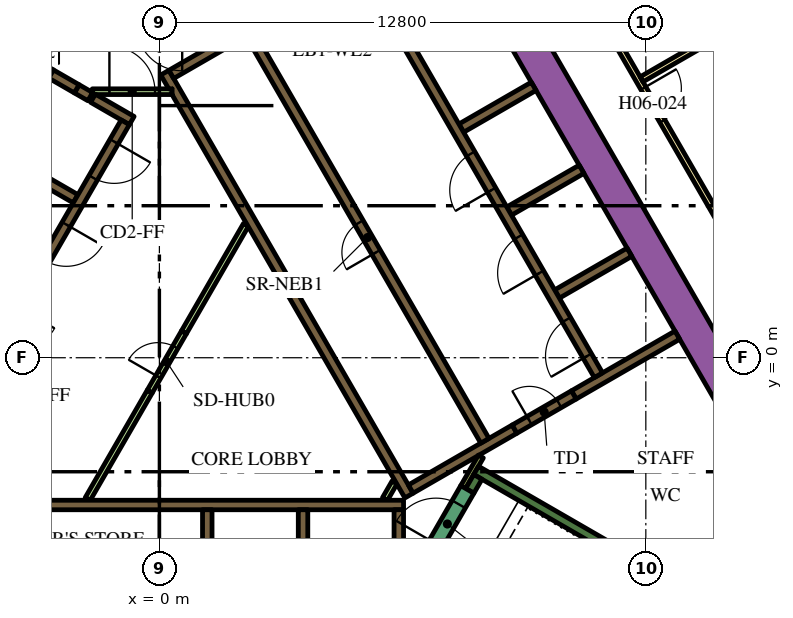
"""IFC4 building model, lengths in metres.
Left out: names, types, materials, properties, quantities, classifications, styles, units other than length and angle.
Written with IfcOpenShell. Run it as: python <this file> out.ifc"""

import sys

from ifc_helpers import new_model, si_unit, direction, frame, frame_2d, origin, place, context, subcontext, project, spatial, polyline, rectangle, outline, extrude, element, fill, save


model = new_model("IFC4")
c1 = context("Model", 3, precision=1e-05, world=origin(), true_north=direction((0.0, 1.0)))
c2 = subcontext(c1, "Body", "Model", "MODEL_VIEW")
j1 = project(units=[si_unit("LENGTHUNIT", "METRE"), si_unit("PLANEANGLEUNIT", "RADIAN")], contexts=[c1])
p1 = place(None, origin())
s1 = spatial("IfcSite", under=j1, at=p1, CompositionType="ELEMENT")
p2 = place(p1, origin())
s2 = spatial("IfcBuilding", under=s1, at=p2, CompositionType="ELEMENT")
p3 = place(p2, frame((0.0, 0.0, 83.7)))
s3 = spatial("IfcBuildingStorey", under=s2, at=p3, CompositionType="ELEMENT", Elevation=83.7)
p4 = place(p3, frame((6.776, 13.364, 0.0), z_axis=(0.0, 0.0, 1.0), x_axis=(0.500004177138, -0.8660229921, 0.0)))
e1 = element("IfcWall", 1, at=p4, inside=s3, PredefinedType="SOLIDWALL", context=c2, shape_type="SweptSolid", body=[
    extrude(rectangle(XDim=20.204, YDim=0.9, at=frame_2d((10.102, 0.0))), origin(), (0.0, 0.0, 1.0), 3.9),
])
p5 = place(p3, frame((11.695, -12.644, 0.0), z_axis=(0.0, 0.0, 1.0), x_axis=(0.500010229568, 0.86601949766, 0.0)))
e2 = element("IfcWall", 2, at=p5, inside=s3, PredefinedType="SOLIDWALL", context=c2, shape_type="SweptSolid", body=[
    extrude(rectangle(XDim=9.326, YDim=0.9, at=frame_2d((4.663, 0.0))), origin(), (0.0, 0.0, 1.0), 3.9),
])
p6 = place(p3, frame((8.334, -2.964, 0.0), z_axis=(0.0, 0.0, 1.0), x_axis=(0.866016039709, -0.500016218704, 0.0)))
e3 = element("IfcWall", 3, at=p6, inside=s3, PredefinedType="SOLIDWALL", context=c2, shape_type="SweptSolid", body=[
    extrude(rectangle(XDim=7.05, YDim=0.25, at=frame_2d((3.525, 0.0))), origin(), (0.0, 0.0, 1.0), 3.9),
])
p7 = place(p3, frame((8.168, -3.503, 0.0), z_axis=(0.0, 0.0, 1.0), x_axis=(0.49972245349, 0.866185586049, 0.0)))
e4 = element("IfcWall", 4, at=p7, inside=s3, PredefinedType="SOLIDWALL", context=c2, shape_type="SweptSolid", body=[
    extrude(rectangle(XDim=0.425, YDim=0.25, at=frame_2d((0.212, 0.0))), origin(), (0.0, 0.0, 1.0), 3.9),
])
p8 = place(p3, frame((-5.845, -3.875, 0.0), z_axis=(0.0, 0.0, 1.0), x_axis=(1.0, 0.0, 0.0)))
e5 = element("IfcWall", 5, at=p8, inside=s3, PredefinedType="SOLIDWALL", context=c2, shape_type="SweptSolid", body=[
    extrude(rectangle(XDim=12.27, YDim=0.25, at=frame_2d((6.135, 0.0))), origin(), (0.0, 0.0, 1.0), 3.9),
])
p9 = place(p3, frame((6.3, -7.268, 0.0), z_axis=(0.0, 0.0, 1.0), x_axis=(0.0, 1.0, 0.0)))
e6 = element("IfcWall", 6, at=p9, inside=s3, PredefinedType="SOLIDWALL", context=c2, shape_type="SweptSolid", body=[
    extrude(rectangle(XDim=3.268, YDim=0.25, at=frame_2d((1.634, 0.0))), origin(), (0.0, 0.0, 1.0), 3.9),
])
for number, where, z_axis, x_axis in (
    (7, (3.78, -4.0, 0.0), (0.0, 0.0, 1.0), (0.0, -1.0, 0.0)),
    (8, (1.26, -4.0, 0.0), (0.0, 0.0, 1.0), (0.0, -1.0, 0.0)),
    (9, (10.464, 1.677, 0.0), (0.0, 0.0, 1.0), (0.866, 0.5, 0.0)),
):
    element("IfcWall", number, at=place(p3, frame(where, z_axis=z_axis, x_axis=x_axis)), inside=s3, PredefinedType="SOLIDWALL", context=c2, shape_type="SweptSolid", body=[
        extrude(rectangle(XDim=2.2, YDim=0.25, at=frame_2d((1.1, 0.0))), origin(), (0.0, 0.0, 1.0), 3.9),
    ])
p10 = place(p3, frame((13.629, 0.594, 0.0), z_axis=(0.0, 0.0, 1.0), x_axis=(-0.86602790099, -0.499995674689, 0.0)))
e10 = element("IfcWall", 10, at=p10, inside=s3, PredefinedType="SOLIDWALL", context=c2, shape_type="SweptSolid", body=[
    extrude(rectangle(XDim=3.146, YDim=0.25, at=frame_2d((1.573, 0.0))), origin(), (0.0, 0.0, 1.0), 3.9),
])
p11 = place(p3, origin())
e11 = element("IfcWall", 11, at=p11, inside=s3, PredefinedType="SOLIDWALL", context=c2, shape_type="SweptSolid", body=[
    extrude(outline(polyline([(0.335, 6.925), (0.335, 7.075), (0.335, 7.075), (0.335, 7.075), (0.245, 7.075), (0.079, 7.363), (0.035, 7.439), (0.252, 7.564), (0.377, 7.348), (6.552, -3.348), (6.677, -3.564), (6.46, -3.689), (4.897, -0.981), (0.332, 6.925), (0.335, 6.925), (0.335, 6.925), (0.335, 6.925)])), origin(), (0.0, 0.0, 1.0), 3.9),
])
p12 = place(p3, frame((0.314, 7.456, 0.0), z_axis=(0.0, 0.0, 1.0), x_axis=(0.866013897511, 0.50001992892, 0.0)))
e12 = element("IfcWall", 12, at=p12, inside=s3, PredefinedType="SOLIDWALL", context=c2, shape_type="SweptSolid", body=[
    extrude(rectangle(XDim=3.268, YDim=0.25, at=frame_2d((1.634, 0.0))), origin(), (0.0, 0.0, 1.0), 3.9),
])
p13 = place(p3, frame((6.614, -3.456, 0.0), z_axis=(0.0, 0.0, 1.0), x_axis=(0.86602447079, 0.500001615989, 0.0)))
e13 = element("IfcWall", 13, at=p13, inside=s3, PredefinedType="SOLIDWALL", context=c2, shape_type="SweptSolid", body=[
    extrude(rectangle(XDim=3.154, YDim=0.25, at=frame_2d((1.577, 0.0))), origin(), (0.0, 0.0, 1.0), 3.9),
])
for number, where, z_axis, x_axis in (
    (14, (7.944, 6.041, 0.0), (0.0, 0.0, 1.0), (0.866, 0.5, 0.0)),
    (15, (9.204, 3.859, 0.0), (0.0, 0.0, 1.0), (0.866, 0.5, 0.0)),
):
    element("IfcWall", number, at=place(p3, frame(where, z_axis=z_axis, x_axis=x_axis)), inside=s3, PredefinedType="SOLIDWALL", context=c2, shape_type="SweptSolid", body=[
        extrude(rectangle(XDim=2.2, YDim=0.25, at=frame_2d((1.1, 0.0))), origin(), (0.0, 0.0, 1.0), 3.9),
    ])
p14 = place(p3, frame((-8.06, -1.311, 0.0), z_axis=(0.0, 0.0, 1.0), x_axis=(0.50000273126, 0.866023826885, 0.0)))
e16 = element("IfcWall", 16, at=p14, inside=s3, PredefinedType="SOLIDWALL", context=c2, shape_type="SweptSolid", body=[
    extrude(rectangle(XDim=10.33, YDim=0.25, at=frame_2d((5.165, 0.0))), origin(), (0.0, 0.0, 1.0), 3.9),
])
p15 = place(p3, frame((-1.819, 6.87, 0.0), z_axis=(0.0, 0.0, 1.0), x_axis=(-0.866294599386, 0.499533449405, 0.0)))
e17 = element("IfcWall", 17, at=p15, inside=s3, PredefinedType="SOLIDWALL", context=c2, shape_type="SweptSolid", body=[
    extrude(rectangle(XDim=0.41, YDim=0.25, at=frame_2d((0.205, 0.0))), origin(), (0.0, 0.0, 1.0), 3.9),
])
p16 = place(p3, frame((-2.849, 7.465, 0.0), z_axis=(0.0, 0.0, 1.0), x_axis=(0.865955664968, -0.500120771724, 0.0)))
e18 = element("IfcWall", 18, at=p16, inside=s3, PredefinedType="SOLIDWALL", context=c2, shape_type="SweptSolid", body=[
    extrude(rectangle(XDim=0.778, YDim=0.25, at=frame_2d((0.389, 0.0))), origin(), (0.0, 0.0, 1.0), 3.9),
])
p17 = place(p3, frame((-0.728, 6.24, 0.0), z_axis=(0.0, 0.0, 1.0), x_axis=(-0.866002680491, 0.500039355833, 0.0)))
e19 = element("IfcWall", 19, at=p17, inside=s3, PredefinedType="SOLIDWALL", context=c2, shape_type="SweptSolid", body=[
    extrude(rectangle(XDim=1.178, YDim=0.25, at=frame_2d((0.589, 0.0))), origin(), (0.0, 0.0, 1.0), 3.9),
])
p18 = place(p3, frame((-2.204, 4.182, 0.0), z_axis=(0.0, 0.0, 1.0), x_axis=(-0.866008176907, 0.50002983664, 0.0)))
e20 = element("IfcWall", 20, at=p18, inside=s3, PredefinedType="SOLIDWALL", context=c2, shape_type="SweptSolid", body=[
    extrude(rectangle(XDim=2.2, YDim=0.25, at=frame_2d((1.1, 0.0))), origin(), (0.0, 0.0, 1.0), 3.9),
])
p19 = place(p3, frame((5.936, -3.718, 0.0), z_axis=(0.0, 0.0, 1.0), x_axis=(0.499890179513, 0.866088799389, 0.0)))
e21 = element("IfcWall", 21, at=p19, inside=s3, PredefinedType="PARTITIONING", context=c2, shape_type="SweptSolid", body=[
    extrude(rectangle(XDim=0.504, YDim=0.15, at=frame_2d((0.252, 0.0))), origin(), (0.0, 0.0, 1.0), 2.75),
])
p20 = place(p3, frame((8.459, -2.599, 0.0), z_axis=(0.0, 0.0, 1.0), x_axis=(-0.500041054325, -0.866001699761, 0.0)))
e22 = element("IfcWall", 22, at=p20, inside=s3, PredefinedType="PARTITIONING", context=c2, shape_type="SweptSolid", body=[
    extrude(rectangle(XDim=0.929, YDim=0.15, at=frame_2d((0.464, 0.0))), origin(), (0.0, 0.0, 1.0), 3.9),
])
for number, where, z_axis, x_axis in (
    (23, (-1.887, -3.718, 0.0), (0.0, 0.0, 1.0), (0.5, 0.866, 0.0)),
    (24, (0.645, 0.667, 0.0), (0.0, 0.0, 1.0), (0.5, 0.866, 0.0)),
):
    element("IfcWall", number, at=place(p3, frame(where, z_axis=z_axis, x_axis=x_axis)), inside=s3, PredefinedType="PARTITIONING", context=c2, shape_type="SweptSolid", body=[
        extrude(rectangle(XDim=3.263, YDim=0.15, at=frame_2d((1.632, 0.0))), origin(), (0.0, 0.0, 1.0), 2.75),
    ])
p21 = place(p3, frame((11.553, -0.46, 0.0), z_axis=(0.0, 0.0, 1.0), x_axis=(-0.500006514828, 0.866021642414, 0.0)))
e25 = element("IfcWall", 25, at=p21, inside=s3, PredefinedType="SOLIDWALL", context=c2, shape_type="SweptSolid", body=[
    extrude(rectangle(XDim=12.35, YDim=0.25, at=frame_2d((6.175, 0.0))), origin(), (0.0, 0.0, 1.0), 3.9),
])
p22 = place(p21, frame((0.585, 0.0, 0.0)))
e26 = element("IfcOpeningElement", 26, at=p22, cuts=e25, PredefinedType="OPENING", context=c2, shape_type="SweptSolid", body=[
    extrude(rectangle(XDim=1.1, YDim=2.1, at=frame_2d((0.55, 1.05))), frame((0.0, 0.135, 0.0), z_axis=(0.0, -1.0, 0.0), x_axis=(1.0, 0.0, 0.0)), (0.0, 0.0, 1.0), 0.27),
])
p23 = place(p21, frame((3.105, 0.0, 0.0)))
e27 = element("IfcOpeningElement", 27, at=p23, cuts=e25, PredefinedType="OPENING", context=c2, shape_type="SweptSolid", body=[
    extrude(rectangle(XDim=1.1, YDim=2.1, at=frame_2d((0.55, 1.05))), frame((0.0, 0.135, 0.0), z_axis=(0.0, -1.0, 0.0), x_axis=(1.0, 0.0, 0.0)), (0.0, 0.0, 1.0), 0.27),
])
p24 = place(p21, frame((5.625, 0.0, 0.0)))
e28 = element("IfcOpeningElement", 28, at=p24, cuts=e25, PredefinedType="OPENING", context=c2, shape_type="SweptSolid", body=[
    extrude(rectangle(XDim=1.1, YDim=2.1, at=frame_2d((0.55, 1.05))), frame((0.0, 0.135, 0.0), z_axis=(0.0, -1.0, 0.0), x_axis=(1.0, 0.0, 0.0)), (0.0, 0.0, 1.0), 0.27),
])
p25 = place(p3, frame((8.565, -2.185, 0.0), z_axis=(0.0, 0.0, 1.0), x_axis=(-0.499997954832, 0.866026584559, 0.0)))
e29 = element("IfcWall", 29, at=p25, inside=s3, PredefinedType="SOLIDWALL", context=c2, shape_type="SweptSolid", body=[
    extrude(rectangle(XDim=12.35, YDim=0.25, at=frame_2d((6.175, 0.0))), origin(), (0.0, 0.0, 1.0), 3.9),
])
p26 = place(p25, frame((5.725, 0.0, 0.0)))
e30 = element("IfcOpeningElement", 30, at=p26, cuts=e29, PredefinedType="OPENING", context=c2, shape_type="SweptSolid", body=[
    extrude(rectangle(XDim=0.9, YDim=2.1, at=frame_2d((0.45, 1.05))), frame((0.0, 0.135, 0.0), z_axis=(0.0, -1.0, 0.0), x_axis=(1.0, 0.0, 0.0)), (0.0, 0.0, 1.0), 0.27),
])
p27 = place(p3, frame((-0.898, 6.194, 0.0), z_axis=(0.0, 0.0, 1.0), x_axis=(-0.499996202215, -0.866027596426, 0.0)))
e31 = element("IfcWall", 31, at=p27, inside=s3, PredefinedType="SOLIDWALL", context=c2, shape_type="SweptSolid", body=[
    extrude(rectangle(XDim=9.83, YDim=0.25, at=frame_2d((4.915, 0.0))), origin(), (0.0, 0.0, 1.0), 3.9),
])
p28 = place(p27, frame((0.585, 0.0, 0.0)))
e32 = element("IfcOpeningElement", 32, at=p28, cuts=e31, PredefinedType="OPENING", context=c2, shape_type="SweptSolid", body=[
    extrude(rectangle(XDim=1.1, YDim=2.1, at=frame_2d((0.55, 1.05))), frame((0.0, 0.135, 0.0), z_axis=(0.0, -1.0, 0.0), x_axis=(1.0, 0.0, 0.0)), (0.0, 0.0, 1.0), 0.27),
])
p29 = place(p27, frame((3.105, 0.0, 0.0)))
e33 = element("IfcOpeningElement", 33, at=p29, cuts=e31, PredefinedType="OPENING", context=c2, shape_type="SweptSolid", body=[
    extrude(rectangle(XDim=1.1, YDim=2.1, at=frame_2d((0.55, 1.05))), frame((0.0, 0.135, 0.0), z_axis=(0.0, -1.0, 0.0), x_axis=(1.0, 0.0, 0.0)), (0.0, 0.0, 1.0), 0.27),
])
p30 = place(p27, frame((5.625, 0.0, 0.0)))
e34 = element("IfcOpeningElement", 34, at=p30, cuts=e31, PredefinedType="OPENING", context=c2, shape_type="SweptSolid", body=[
    extrude(rectangle(XDim=1.1, YDim=2.1, at=frame_2d((0.55, 1.05))), frame((0.0, 0.135, 0.0), z_axis=(0.0, -1.0, 0.0), x_axis=(1.0, 0.0, 0.0)), (0.0, 0.0, 1.0), 0.27),
])
p31 = place(p27, frame((8.145, 0.0, 0.0)))
e35 = element("IfcOpeningElement", 35, at=p31, cuts=e31, PredefinedType="OPENING", context=c2, shape_type="SweptSolid", body=[
    extrude(rectangle(XDim=1.1, YDim=2.1, at=frame_2d((0.55, 1.05))), frame((0.0, 0.135, 0.0), z_axis=(0.0, -1.0, 0.0), x_axis=(1.0, 0.0, 0.0)), (0.0, 0.0, 1.0), 0.27),
])
p32 = place(p3, frame((7.053, -5.284, 0.0), z_axis=(0.0, 0.0, 1.0), x_axis=(0.500078061341, 0.865980330357, 0.0)))
e36 = element("IfcWall", 36, at=p32, inside=s3, PredefinedType="SOLIDWALL", context=c2, shape_type="SweptSolid", body=[
    extrude(rectangle(XDim=2.1, YDim=0.4, at=frame_2d((1.05, 0.0))), origin(), (0.0, 0.0, 1.0), 3.9),
])
p33 = place(p32, frame((0.45, 0.0, 0.0)))
e37 = element("IfcOpeningElement", 37, at=p33, cuts=e36, PredefinedType="OPENING", context=c2, shape_type="SweptSolid", body=[
    extrude(rectangle(XDim=1.2, YDim=2.1, at=frame_2d((0.6, 1.05))), frame((0.0, 0.21, 0.0), z_axis=(0.0, -1.0, 0.0), x_axis=(1.0, 0.0, 0.0)), (0.0, 0.0, 1.0), 0.42),
])
p34 = place(p3, frame((9.346, -1.879, 0.0), z_axis=(0.0, 0.0, 1.0), x_axis=(0.866047807691, 0.499961193289, 0.0)))
e38 = element("IfcWall", 38, at=p34, inside=s3, PredefinedType="SOLIDWALL", context=c2, shape_type="SweptSolid", body=[
    extrude(rectangle(XDim=1.8, YDim=0.25, at=frame_2d((0.9, 0.0))), origin(), (0.0, 0.0, 1.0), 3.9),
])
p35 = place(p34, frame((0.45, 0.0, 0.0)))
e39 = element("IfcOpeningElement", 39, at=p35, cuts=e38, PredefinedType="OPENING", context=c2, shape_type="SweptSolid", body=[
    extrude(rectangle(XDim=0.9, YDim=2.1, at=frame_2d((0.45, 1.05))), frame((0.0, 0.135, 0.0), z_axis=(0.0, -1.0, 0.0), x_axis=(1.0, 0.0, 0.0)), (0.0, 0.0, 1.0), 0.27),
])
p36 = place(p3, frame((-1.765, 7.0, 0.0), z_axis=(0.0, 0.0, 1.0), x_axis=(1.0, 0.0, 0.0)))
e40 = element("IfcWall", 40, at=p36, inside=s3, PredefinedType="PARTITIONING", context=c2, shape_type="SweptSolid", body=[
    extrude(rectangle(XDim=2.1, YDim=0.15, at=frame_2d((1.05, 0.0))), origin(), (0.0, 0.0, 1.0), 2.75),
])
p37 = place(p36, frame((0.45, 0.0, 0.0)))
e41 = element("IfcOpeningElement", 41, at=p37, cuts=e40, PredefinedType="OPENING", context=c2, shape_type="SweptSolid", body=[
    extrude(rectangle(XDim=1.2, YDim=2.1, at=frame_2d((0.6, 1.05))), frame((0.0, 0.085, 0.0), z_axis=(0.0, -1.0, 0.0), x_axis=(1.0, 0.0, 0.0)), (0.0, 0.0, 1.0), 0.17),
])
p38 = place(p3, frame((-0.255, -0.892, 0.0), z_axis=(0.0, 0.0, 1.0), x_axis=(0.500062916607, 0.865989075817, 0.0)))
e42 = element("IfcWall", 42, at=p38, inside=s3, PredefinedType="PARTITIONING", context=c2, shape_type="SweptSolid", body=[
    extrude(rectangle(XDim=1.8, YDim=0.15, at=frame_2d((0.9, 0.0))), origin(), (0.0, 0.0, 1.0), 2.75),
])
p39 = place(p38, frame((0.45, 0.0, 0.0)))
e43 = element("IfcOpeningElement", 43, at=p39, cuts=e42, PredefinedType="OPENING", context=c2, shape_type="SweptSolid", body=[
    extrude(rectangle(XDim=0.9, YDim=2.1, at=frame_2d((0.45, 1.05))), frame((0.0, 0.085, 0.0), z_axis=(0.0, -1.0, 0.0), x_axis=(1.0, 0.0, 0.0)), (0.0, 0.0, 1.0), 0.17),
])
p40 = place(p3, frame((6.163, 18.475, 0.0), z_axis=(0.0, 0.0, 1.0), x_axis=(0.500001317485, -0.866024643133, 0.0)))
e44 = element("IfcWall", 44, at=p40, inside=s3, PredefinedType="PARTITIONING", context=c2, shape_type="SweptSolid", body=[
    extrude(rectangle(XDim=25.767, YDim=0.15, at=frame_2d((12.883, 0.0))), origin(), (0.0, 0.0, 1.0), 2.75),
])
p41 = place(p40, frame((24.241, 0.0, 0.0)))
e45 = element("IfcOpeningElement", 45, at=p41, cuts=e44, PredefinedType="OPENING", context=c2, shape_type="SweptSolid", body=[
    extrude(rectangle(XDim=1.0, YDim=2.1, at=frame_2d((0.5, 1.05))), frame((0.0, 0.085, 0.0), z_axis=(0.0, -1.0, 0.0), x_axis=(1.0, 0.0, 0.0)), (0.0, 0.0, 1.0), 0.17),
])
p42 = place(p40, frame((13.144, 0.0, 0.0)))
e46 = element("IfcOpeningElement", 46, at=p42, cuts=e44, PredefinedType="OPENING", context=c2, shape_type="SweptSolid", body=[
    extrude(rectangle(XDim=1.0, YDim=2.1, at=frame_2d((0.5, 1.05))), frame((0.0, 0.085, 0.0), z_axis=(0.0, -1.0, 0.0), x_axis=(1.0, 0.0, 0.0)), (0.0, 0.0, 1.0), 0.17),
])
p43 = place(p40, frame((10.874, 0.0, 0.0)))
e47 = element("IfcOpeningElement", 47, at=p43, cuts=e44, PredefinedType="OPENING", context=c2, shape_type="SweptSolid", body=[
    extrude(rectangle(XDim=0.9, YDim=2.1, at=frame_2d((0.45, 1.05))), frame((0.0, 0.085, 0.0), z_axis=(0.0, -1.0, 0.0), x_axis=(1.0, 0.0, 0.0)), (0.0, 0.0, 1.0), 0.17),
])
p44 = place(p40, frame((3.718, 0.0, 0.0)))
e48 = element("IfcOpeningElement", 48, at=p44, cuts=e44, PredefinedType="OPENING", context=c2, shape_type="SweptSolid", body=[
    extrude(rectangle(XDim=1.1, YDim=2.1, at=frame_2d((0.55, 1.05))), frame((0.0, 0.085, 0.0), z_axis=(0.0, -1.0, 0.0), x_axis=(1.0, 0.0, 0.0)), (0.0, 0.0, 1.0), 0.17),
])
p45 = place(p40, frame((2.411, 0.0, 0.0)))
e49 = element("IfcOpeningElement", 49, at=p45, cuts=e44, PredefinedType="OPENING", context=c2, shape_type="SweptSolid", body=[
    extrude(rectangle(XDim=1.0, YDim=2.1, at=frame_2d((0.5, 1.05))), frame((0.0, 0.085, 0.0), z_axis=(0.0, -1.0, 0.0), x_axis=(1.0, 0.0, 0.0)), (0.0, 0.0, 1.0), 0.17),
])
p46 = place(p3, frame((18.484, 10.672, 0.0), z_axis=(0.0, 0.0, 1.0), x_axis=(-0.866019162053, -0.50001081084, 0.0)))
e50 = element("IfcWall", 50, at=p46, inside=s3, PredefinedType="PARTITIONING", context=c2, shape_type="SweptSolid", body=[
    extrude(rectangle(XDim=6.694, YDim=0.15, at=frame_2d((3.347, 0.0))), origin(), (0.0, 0.0, 1.0), 2.75),
])
p47 = place(p22, origin())
e51 = element("IfcDoor", 51, at=p47, inside=s3, OperationType="DOUBLE_DOOR_SLIDING", PredefinedType="DOOR", context=c2, shape_type="SweptSolid", body=[
    extrude(rectangle(XDim=1.1, YDim=2.1, at=frame_2d((0.55, 1.05))), frame((0.0, 0.025, 0.0), z_axis=(0.0, -1.0, 0.0), x_axis=(1.0, 0.0, 0.0)), (0.0, 0.0, 1.0), 0.05),
])
fill(e26, e51)
p48 = place(p23, origin())
e52 = element("IfcDoor", 52, at=p48, inside=s3, OperationType="DOUBLE_DOOR_SLIDING", PredefinedType="DOOR", context=c2, shape_type="SweptSolid", body=[
    extrude(rectangle(XDim=1.1, YDim=2.1, at=frame_2d((0.55, 1.05))), frame((0.0, 0.025, 0.0), z_axis=(0.0, -1.0, 0.0), x_axis=(1.0, 0.0, 0.0)), (0.0, 0.0, 1.0), 0.05),
])
fill(e27, e52)
p49 = place(p24, origin())
e53 = element("IfcDoor", 53, at=p49, inside=s3, OperationType="DOUBLE_DOOR_SLIDING", PredefinedType="DOOR", context=c2, shape_type="SweptSolid", body=[
    extrude(rectangle(XDim=1.1, YDim=2.1, at=frame_2d((0.55, 1.05))), frame((0.0, 0.025, 0.0), z_axis=(0.0, -1.0, 0.0), x_axis=(1.0, 0.0, 0.0)), (0.0, 0.0, 1.0), 0.05),
])
fill(e28, e53)
p50 = place(p26, origin())
e54 = element("IfcDoor", 54, at=p50, inside=s3, OperationType="SINGLE_SWING_LEFT", PredefinedType="DOOR", context=c2, shape_type="SweptSolid", body=[
    extrude(rectangle(XDim=0.9, YDim=2.1, at=frame_2d((0.45, 1.05))), frame((0.0, 0.025, 0.0), z_axis=(0.0, -1.0, 0.0), x_axis=(1.0, 0.0, 0.0)), (0.0, 0.0, 1.0), 0.05),
])
fill(e30, e54)
p51 = place(p28, origin())
e55 = element("IfcDoor", 55, at=p51, inside=s3, OperationType="DOUBLE_DOOR_SLIDING", PredefinedType="DOOR", context=c2, shape_type="SweptSolid", body=[
    extrude(rectangle(XDim=1.1, YDim=2.1, at=frame_2d((0.55, 1.05))), frame((0.0, 0.025, 0.0), z_axis=(0.0, -1.0, 0.0), x_axis=(1.0, 0.0, 0.0)), (0.0, 0.0, 1.0), 0.05),
])
fill(e32, e55)
p52 = place(p29, origin())
e56 = element("IfcDoor", 56, at=p52, inside=s3, OperationType="DOUBLE_DOOR_SLIDING", PredefinedType="DOOR", context=c2, shape_type="SweptSolid", body=[
    extrude(rectangle(XDim=1.1, YDim=2.1, at=frame_2d((0.55, 1.05))), frame((0.0, 0.025, 0.0), z_axis=(0.0, -1.0, 0.0), x_axis=(1.0, 0.0, 0.0)), (0.0, 0.0, 1.0), 0.05),
])
fill(e33, e56)
p53 = place(p33, origin())
e57 = element("IfcDoor", 57, at=p53, inside=s3, OperationType="SINGLE_SWING_LEFT", PredefinedType="DOOR", context=c2, shape_type="SweptSolid", body=[
    extrude(rectangle(XDim=1.2, YDim=2.1, at=frame_2d((0.6, 1.05))), frame((0.0, 0.025, 0.0), z_axis=(0.0, -1.0, 0.0), x_axis=(1.0, 0.0, 0.0)), (0.0, 0.0, 1.0), 0.05),
])
fill(e37, e57)
p54 = place(p35, origin())
e58 = element("IfcDoor", 58, at=p54, inside=s3, OperationType="SINGLE_SWING_LEFT", PredefinedType="DOOR", context=c2, shape_type="SweptSolid", body=[
    extrude(rectangle(XDim=0.9, YDim=2.1, at=frame_2d((0.45, 1.05))), frame((0.0, 0.025, 0.0), z_axis=(0.0, -1.0, 0.0), x_axis=(1.0, 0.0, 0.0)), (0.0, 0.0, 1.0), 0.05),
])
fill(e39, e58)
p55 = place(p37, origin())
e59 = element("IfcDoor", 59, at=p55, inside=s3, OperationType="SINGLE_SWING_LEFT", PredefinedType="DOOR", context=c2, shape_type="SweptSolid", body=[
    extrude(rectangle(XDim=1.2, YDim=2.1, at=frame_2d((0.6, 1.05))), frame((0.0, 0.025, 0.0), z_axis=(0.0, -1.0, 0.0), x_axis=(1.0, 0.0, 0.0)), (0.0, 0.0, 1.0), 0.05),
])
fill(e41, e59)
p56 = place(p39, origin())
e60 = element("IfcDoor", 60, at=p56, inside=s3, OperationType="SINGLE_SWING_LEFT", PredefinedType="DOOR", context=c2, shape_type="SweptSolid", body=[
    extrude(rectangle(XDim=0.9, YDim=2.1, at=frame_2d((0.45, 1.05))), frame((0.0, 0.025, 0.0), z_axis=(0.0, -1.0, 0.0), x_axis=(1.0, 0.0, 0.0)), (0.0, 0.0, 1.0), 0.05),
])
fill(e43, e60)
p57 = place(p42, origin())
e61 = element("IfcDoor", 61, at=p57, inside=s3, OperationType="SINGLE_SWING_LEFT", PredefinedType="DOOR", context=c2, shape_type="SweptSolid", body=[
    extrude(rectangle(XDim=1.0, YDim=2.1, at=frame_2d((0.5, 1.05))), frame((0.0, 0.025, 0.0), z_axis=(0.0, -1.0, 0.0), x_axis=(1.0, 0.0, 0.0)), (0.0, 0.0, 1.0), 0.05),
])
fill(e46, e61)
save(model, sys.argv[1])
